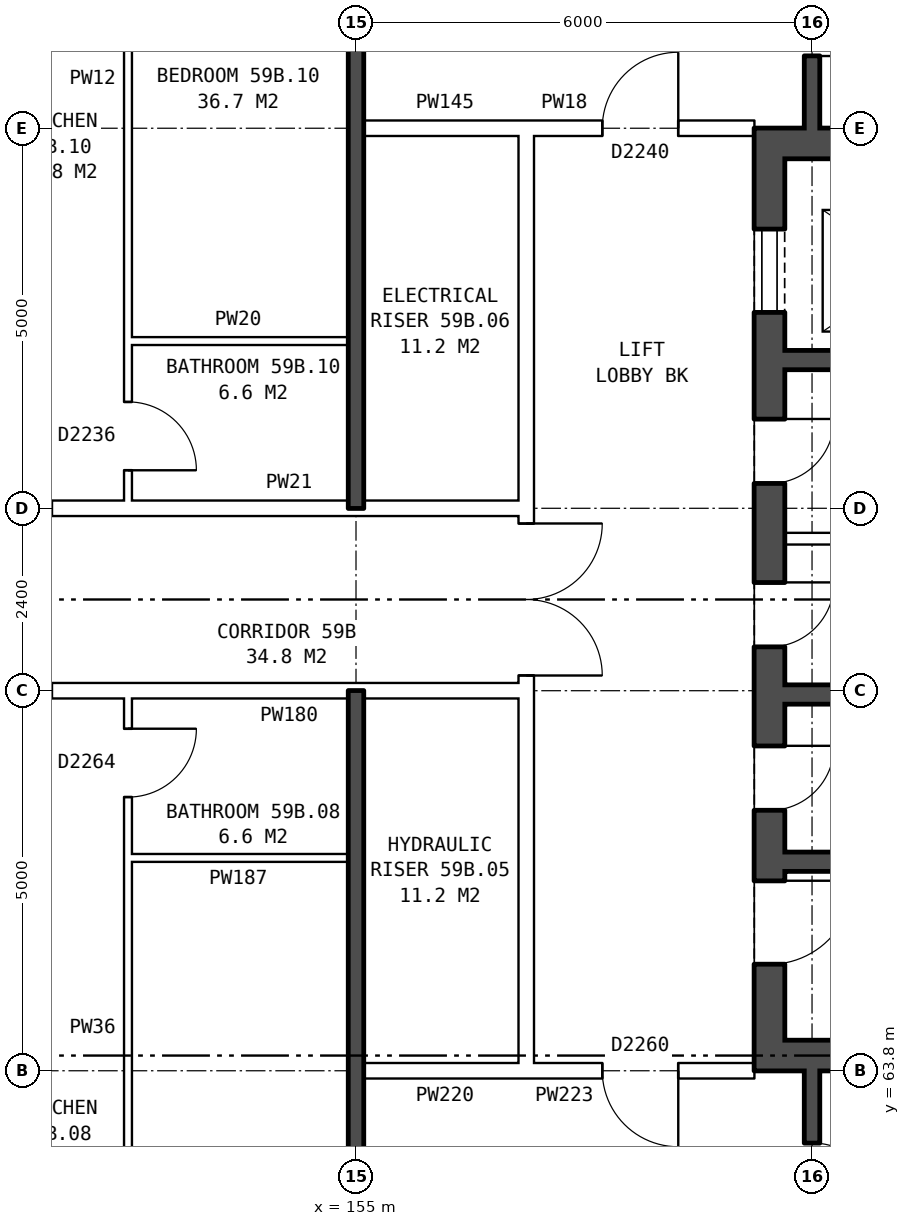
"""IFC4 building model, lengths in metres.
Left out: names, types, materials, properties, quantities, classifications, styles, units other than length and angle.
Written with IfcOpenShell. Run it as: python <this file> out.ifc"""

import sys

from ifc_helpers import new_model, si_unit, direction, frame, frame_2d, origin, place, context, subcontext, project, spatial, rectangle, extrude, element, fill, save


model = new_model("IFC4")
c1 = context("Model", 3, precision=1e-05, world=origin(), true_north=direction((0.0, 1.0)))
c2 = subcontext(c1, "Body", "Model", "MODEL_VIEW")
j1 = project(units=[si_unit("LENGTHUNIT", "METRE"), si_unit("PLANEANGLEUNIT", "RADIAN")], contexts=[c1])
p1 = place(None, origin())
s1 = spatial("IfcSite", under=j1, at=p1, CompositionType="ELEMENT")
p2 = place(p1, origin())
s2 = spatial("IfcBuilding", under=s1, at=p2, CompositionType="ELEMENT")
p3 = place(p2, frame((0.0, 0.0, 209.0)))
s3 = spatial("IfcBuildingStorey", under=s2, at=p3, CompositionType="ELEMENT", Elevation=209.0)
p4 = place(p3, frame((160.44, 76.2, 0.0), z_axis=(0.0, 0.0, 1.0), x_axis=(0.0, -1.0, 0.0)))
e1 = element("IfcWall", 1, at=p4, inside=s3, PredefinedType="SHEAR", context=c2, shape_type="SweptSolid", body=[
    extrude(rectangle(XDim=12.4, YDim=0.4, at=frame_2d((6.2, 0.0))), origin(), (0.0, 0.0, 1.0), 2.85),
])
p5 = place(p4, frame((1.325, 0.0, 0.0)))
e2 = element("IfcOpeningElement", 2, at=p5, cuts=e1, PredefinedType="OPENING", context=c2, shape_type="SweptSolid", body=[
    extrude(rectangle(XDim=1.1, YDim=2.1, at=frame_2d((0.55, 1.05))), frame((0.0, 0.21, 0.0), z_axis=(0.0, -1.0, 0.0), x_axis=(1.0, 0.0, 0.0)), (0.0, 0.0, 1.0), 0.42),
])
p6 = place(p4, frame((3.825, 0.0, 0.0)))
e3 = element("IfcOpeningElement", 3, at=p6, cuts=e1, PredefinedType="OPENING", context=c2, shape_type="SweptSolid", body=[
    extrude(rectangle(XDim=0.85, YDim=2.1, at=frame_2d((0.425, 1.05))), frame((0.0, 0.21, 0.0), z_axis=(0.0, -1.0, 0.0), x_axis=(1.0, 0.0, 0.0)), (0.0, 0.0, 1.0), 0.42),
])
p7 = place(p4, frame((5.975, 0.0, 0.0)))
e4 = element("IfcOpeningElement", 4, at=p7, cuts=e1, PredefinedType="OPENING", context=c2, shape_type="SweptSolid", body=[
    extrude(rectangle(XDim=0.85, YDim=2.1, at=frame_2d((0.425, 1.05))), frame((0.0, 0.21, 0.0), z_axis=(0.0, -1.0, 0.0), x_axis=(1.0, 0.0, 0.0)), (0.0, 0.0, 1.0), 0.42),
])
p8 = place(p4, frame((9.9, 0.0, 0.0)))
e5 = element("IfcOpeningElement", 5, at=p8, cuts=e1, PredefinedType="OPENING", context=c2, shape_type="SweptSolid", body=[
    extrude(rectangle(XDim=1.1, YDim=2.1, at=frame_2d((0.55, 1.05))), frame((0.0, 0.21, 0.0), z_axis=(0.0, -1.0, 0.0), x_axis=(1.0, 0.0, 0.0)), (0.0, 0.0, 1.0), 0.42),
])
p9 = place(p4, frame((8.125, 0.0, 0.0)))
e6 = element("IfcOpeningElement", 6, at=p9, cuts=e1, PredefinedType="OPENING", context=c2, shape_type="SweptSolid", body=[
    extrude(rectangle(XDim=0.85, YDim=2.1, at=frame_2d((0.425, 1.05))), frame((0.0, 0.21, 0.0), z_axis=(0.0, -1.0, 0.0), x_axis=(1.0, 0.0, 0.0)), (0.0, 0.0, 1.0), 0.42),
])
for number, where, z_axis, x_axis in (
    (7, (160.64, 76.0, 0.0), (0.0, 0.0, 1.0), (1.0, 0.0, 0.0)),
    (8, (160.64, 64.0, 0.0), (0.0, 0.0, 1.0), (1.0, 0.0, 0.0)),
):
    element("IfcWall", number, at=place(p3, frame(where, z_axis=z_axis, x_axis=x_axis)), inside=s3, PredefinedType="SHEAR", context=c2, shape_type="SweptSolid", body=[
        extrude(rectangle(XDim=7.6, YDim=0.4, at=frame_2d((3.8, 0.0))), origin(), (0.0, 0.0, 1.0), 2.85),
    ])
p10 = place(p3, frame((160.64, 73.15, 0.0), z_axis=(0.0, 0.0, 1.0), x_axis=(1.0, 0.0, 0.0)))
e9 = element("IfcWall", 9, at=p10, inside=s3, PredefinedType="SHEAR", context=c2, shape_type="SweptSolid", body=[
    extrude(rectangle(XDim=4.775, YDim=0.25, at=frame_2d((2.388, 0.0))), origin(), (0.0, 0.0, 1.0), 2.85),
])
p11 = place(p3, frame((160.64, 70.8, 0.0), z_axis=(0.0, 0.0, 1.0), x_axis=(1.0, 0.0, 0.0)))
e10 = element("IfcWall", 10, at=p11, inside=s3, PredefinedType="PARTITIONING", context=c2, shape_type="SweptSolid", body=[
    extrude(rectangle(XDim=2.525, YDim=0.15, at=frame_2d((1.263, 0.0))), origin(), (0.0, 0.0, 1.0), 2.85),
])
p12 = place(p3, frame((160.64, 68.75, 0.0), z_axis=(0.0, 0.0, 1.0), x_axis=(1.0, 0.0, 0.0)))
e11 = element("IfcWall", 11, at=p12, inside=s3, PredefinedType="SHEAR", context=c2, shape_type="SweptSolid", body=[
    extrude(rectangle(XDim=7.6, YDim=0.25, at=frame_2d((3.8, 0.0))), origin(), (0.0, 0.0, 1.0), 2.85),
])
p13 = place(p12, frame((5.175, 0.0, 0.0)))
e12 = element("IfcOpeningElement", 12, at=p13, cuts=e11, PredefinedType="OPENING", context=c2, shape_type="SweptSolid", body=[
    extrude(rectangle(XDim=1.1, YDim=2.1, at=frame_2d((0.55, 1.05))), frame((0.0, 0.135, 0.0), z_axis=(0.0, -1.0, 0.0), x_axis=(1.0, 0.0, 0.0)), (0.0, 0.0, 1.0), 0.27),
])
p14 = place(p12, frame((2.975, 0.0, 0.0)))
e13 = element("IfcOpeningElement", 13, at=p14, cuts=e11, PredefinedType="OPENING", context=c2, shape_type="SweptSolid", body=[
    extrude(rectangle(XDim=0.85, YDim=2.1, at=frame_2d((0.425, 1.05))), frame((0.0, 0.135, 0.0), z_axis=(0.0, -1.0, 0.0), x_axis=(1.0, 0.0, 0.0)), (0.0, 0.0, 1.0), 0.27),
])
p15 = place(p3, frame((160.64, 66.55, 0.0), z_axis=(0.0, 0.0, 1.0), x_axis=(1.0, 0.0, 0.0)))
e14 = element("IfcWall", 14, at=p15, inside=s3, PredefinedType="SHEAR", context=c2, shape_type="SweptSolid", body=[
    extrude(rectangle(XDim=2.525, YDim=0.25, at=frame_2d((1.263, 0.0))), origin(), (0.0, 0.0, 1.0), 2.85),
])
p16 = place(p3, frame((157.24, 63.9, 0.0), z_axis=(0.0, 0.0, 1.0), x_axis=(0.0, 1.0, 0.0)))
e15 = element("IfcWall", 15, at=p16, inside=s3, PredefinedType="PARTITIONING", context=c2, shape_type="SweptSolid", body=[
    extrude(rectangle(XDim=12.2, YDim=0.2, at=frame_2d((6.1, 0.0))), origin(), (0.0, 0.0, 1.0), 2.85),
])
p17 = place(p16, frame((5.1, 0.0, 0.0)))
e16 = element("IfcOpeningElement", 16, at=p17, cuts=e15, PredefinedType="OPENING", context=c2, shape_type="SweptSolid", body=[
    extrude(rectangle(XDim=2.0, YDim=2.1, at=frame_2d((1.0, 1.05))), frame((0.0, 0.11, 0.0), z_axis=(0.0, -1.0, 0.0), x_axis=(1.0, 0.0, 0.0)), (0.0, 0.0, 1.0), 0.22),
])
p18 = place(p3, frame((155.1, 63.8, 0.0), z_axis=(0.0, 0.0, 1.0), x_axis=(1.0, 0.0, 0.0)))
e17 = element("IfcWall", 17, at=p18, inside=s3, PredefinedType="PARTITIONING", context=c2, shape_type="SweptSolid", body=[
    extrude(rectangle(XDim=2.14, YDim=0.2, at=frame_2d((1.07, 0.0))), origin(), (0.0, 0.0, 1.0), 2.85),
])
p19 = place(p3, frame((157.24, 63.8, 0.0), z_axis=(0.0, 0.0, 1.0), x_axis=(1.0, 0.0, 0.0)))
e18 = element("IfcWall", 18, at=p19, inside=s3, PredefinedType="PARTITIONING", context=c2, shape_type="SweptSolid", body=[
    extrude(rectangle(XDim=3.0, YDim=0.2, at=frame_2d((1.5, 0.0))), origin(), (0.0, 0.0, 1.0), 2.85),
])
p20 = place(p19, frame((1.0, 0.0, 0.0)))
e19 = element("IfcOpeningElement", 19, at=p20, cuts=e18, PredefinedType="OPENING", context=c2, shape_type="SweptSolid", body=[
    extrude(rectangle(XDim=1.0, YDim=2.1, at=frame_2d((0.5, 1.05))), frame((0.0, 0.11, 0.0), z_axis=(0.0, -1.0, 0.0), x_axis=(1.0, 0.0, 0.0)), (0.0, 0.0, 1.0), 0.22),
])
p21 = place(p3, frame((152.0, 66.6, 0.0), z_axis=(0.0, 0.0, 1.0), x_axis=(1.0, 0.0, 0.0)))
e20 = element("IfcWall", 20, at=p21, inside=s3, PredefinedType="PARTITIONING", context=c2, shape_type="SweptSolid", body=[
    extrude(rectangle(XDim=2.9, YDim=0.1, at=frame_2d((1.45, 0.0))), origin(), (0.0, 0.0, 1.0), 2.85),
])
p22 = place(p3, frame((142.76, 68.8, 0.0), z_axis=(0.0, 0.0, 1.0), x_axis=(1.0, 0.0, 0.0)))
e21 = element("IfcWall", 21, at=p22, inside=s3, PredefinedType="PARTITIONING", context=c2, shape_type="SweptSolid", body=[
    extrude(rectangle(XDim=14.48, YDim=0.2, at=frame_2d((7.24, 0.0))), origin(), (0.0, 0.0, 1.0), 2.85),
])
p23 = place(p22, frame((4.24, 0.0, 0.0)))
e22 = element("IfcOpeningElement", 22, at=p23, cuts=e21, PredefinedType="OPENING", context=c2, shape_type="SweptSolid", body=[
    extrude(rectangle(XDim=1.0, YDim=2.1, at=frame_2d((0.5, 1.05))), frame((0.0, 0.11, 0.0), z_axis=(0.0, -1.0, 0.0), x_axis=(1.0, 0.0, 0.0)), (0.0, 0.0, 1.0), 0.22),
])
p24 = place(p22, frame((7.24, 0.0, 0.0)))
e23 = element("IfcOpeningElement", 23, at=p24, cuts=e21, PredefinedType="OPENING", context=c2, shape_type="SweptSolid", body=[
    extrude(rectangle(XDim=1.0, YDim=2.1, at=frame_2d((0.5, 1.05))), frame((0.0, 0.11, 0.0), z_axis=(0.0, -1.0, 0.0), x_axis=(1.0, 0.0, 0.0)), (0.0, 0.0, 1.0), 0.22),
])
p25 = place(p3, frame((142.76, 71.2, 0.0), z_axis=(0.0, 0.0, 1.0), x_axis=(1.0, 0.0, 0.0)))
e24 = element("IfcWall", 24, at=p25, inside=s3, PredefinedType="PARTITIONING", context=c2, shape_type="SweptSolid", body=[
    extrude(rectangle(XDim=14.48, YDim=0.2, at=frame_2d((7.24, 0.0))), origin(), (0.0, 0.0, 1.0), 2.85),
])
p26 = place(p25, frame((4.24, 0.0, 0.0)))
e25 = element("IfcOpeningElement", 25, at=p26, cuts=e24, PredefinedType="OPENING", context=c2, shape_type="SweptSolid", body=[
    extrude(rectangle(XDim=1.0, YDim=2.1, at=frame_2d((0.5, 1.05))), frame((0.0, 0.11, 0.0), z_axis=(0.0, -1.0, 0.0), x_axis=(1.0, 0.0, 0.0)), (0.0, 0.0, 1.0), 0.22),
])
p27 = place(p25, frame((7.24, 0.0, 0.0)))
e26 = element("IfcOpeningElement", 26, at=p27, cuts=e24, PredefinedType="OPENING", context=c2, shape_type="SweptSolid", body=[
    extrude(rectangle(XDim=1.0, YDim=2.1, at=frame_2d((0.5, 1.05))), frame((0.0, 0.11, 0.0), z_axis=(0.0, -1.0, 0.0), x_axis=(1.0, 0.0, 0.0)), (0.0, 0.0, 1.0), 0.22),
])
p28 = place(p3, frame((152.0, 73.4, 0.0), z_axis=(0.0, 0.0, 1.0), x_axis=(1.0, 0.0, 0.0)))
e27 = element("IfcWall", 27, at=p28, inside=s3, PredefinedType="PARTITIONING", context=c2, shape_type="SweptSolid", body=[
    extrude(rectangle(XDim=2.9, YDim=0.1, at=frame_2d((1.45, 0.0))), origin(), (0.0, 0.0, 1.0), 2.85),
])
p29 = place(p3, frame((155.1, 76.2, 0.0), z_axis=(0.0, 0.0, 1.0), x_axis=(1.0, 0.0, 0.0)))
e28 = element("IfcWall", 28, at=p29, inside=s3, PredefinedType="PARTITIONING", context=c2, shape_type="SweptSolid", body=[
    extrude(rectangle(XDim=2.14, YDim=0.2, at=frame_2d((1.07, 0.0))), origin(), (0.0, 0.0, 1.0), 2.85),
])
p30 = place(p3, frame((157.24, 76.2, 0.0), z_axis=(0.0, 0.0, 1.0), x_axis=(1.0, 0.0, 0.0)))
e29 = element("IfcWall", 29, at=p30, inside=s3, PredefinedType="PARTITIONING", context=c2, shape_type="SweptSolid", body=[
    extrude(rectangle(XDim=3.0, YDim=0.2, at=frame_2d((1.5, 0.0))), origin(), (0.0, 0.0, 1.0), 2.85),
])
p31 = place(p30, frame((1.0, 0.0, 0.0)))
e30 = element("IfcOpeningElement", 30, at=p31, cuts=e29, PredefinedType="OPENING", context=c2, shape_type="SweptSolid", body=[
    extrude(rectangle(XDim=1.0, YDim=2.1, at=frame_2d((0.5, 1.05))), frame((0.0, 0.11, 0.0), z_axis=(0.0, -1.0, 0.0), x_axis=(1.0, 0.0, 0.0)), (0.0, 0.0, 1.0), 0.22),
])
p32 = place(p3, frame((152.0, 54.36, 0.0), z_axis=(0.0, 0.0, 1.0), x_axis=(0.0, 1.0, 0.0)))
e31 = element("IfcWall", 31, at=p32, inside=s3, PredefinedType="PARTITIONING", context=c2, shape_type="SweptSolid", body=[
    extrude(rectangle(XDim=14.34, YDim=0.1, at=frame_2d((7.17, 0.0))), origin(), (0.0, 0.0, 1.0), 2.85),
])
p33 = place(p32, frame((5.5, 0.0, 0.0)))
e32 = element("IfcOpeningElement", 32, at=p33, cuts=e31, PredefinedType="OPENING", context=c2, shape_type="SweptSolid", body=[
    extrude(rectangle(XDim=0.9, YDim=2.1, at=frame_2d((0.45, 1.05))), frame((0.0, 0.06, 0.0), z_axis=(0.0, -1.0, 0.0), x_axis=(1.0, 0.0, 0.0)), (0.0, 0.0, 1.0), 0.12),
])
p34 = place(p32, frame((13.04, 0.0, 0.0)))
e33 = element("IfcOpeningElement", 33, at=p34, cuts=e31, PredefinedType="OPENING", context=c2, shape_type="SweptSolid", body=[
    extrude(rectangle(XDim=0.9, YDim=2.1, at=frame_2d((0.45, 1.05))), frame((0.0, 0.06, 0.0), z_axis=(0.0, -1.0, 0.0), x_axis=(1.0, 0.0, 0.0)), (0.0, 0.0, 1.0), 0.12),
])
p35 = place(p3, frame((152.0, 71.3, 0.0), z_axis=(0.0, 0.0, 1.0), x_axis=(0.0, 1.0, 0.0)))
e34 = element("IfcWall", 34, at=p35, inside=s3, PredefinedType="PARTITIONING", context=c2, shape_type="SweptSolid", body=[
    extrude(rectangle(XDim=14.34, YDim=0.1, at=frame_2d((7.17, 0.0))), origin(), (0.0, 0.0, 1.0), 2.85),
])
p36 = place(p35, frame((9.24, 0.0, 0.0)))
e35 = element("IfcOpeningElement", 35, at=p36, cuts=e34, PredefinedType="OPENING", context=c2, shape_type="SweptSolid", body=[
    extrude(rectangle(XDim=0.9, YDim=2.1, at=frame_2d((0.45, 1.05))), frame((0.0, 0.06, 0.0), z_axis=(0.0, -1.0, 0.0), x_axis=(1.0, 0.0, 0.0)), (0.0, 0.0, 1.0), 0.12),
])
p37 = place(p35, frame((0.4, 0.0, 0.0)))
e36 = element("IfcOpeningElement", 36, at=p37, cuts=e34, PredefinedType="OPENING", context=c2, shape_type="SweptSolid", body=[
    extrude(rectangle(XDim=0.9, YDim=2.1, at=frame_2d((0.45, 1.05))), frame((0.0, 0.06, 0.0), z_axis=(0.0, -1.0, 0.0), x_axis=(1.0, 0.0, 0.0)), (0.0, 0.0, 1.0), 0.12),
])
for number, where, z_axis, x_axis in (
    (37, (155.0, 54.36, 0.0), (0.0, 0.0, 1.0), (0.0, 1.0, 0.0)),
    (38, (155.0, 71.2, 0.0), (0.0, 0.0, 1.0), (0.0, 1.0, 0.0)),
):
    element("IfcWall", number, at=place(p3, frame(where, z_axis=z_axis, x_axis=x_axis)), inside=s3, PredefinedType="SOLIDWALL", context=c2, shape_type="SweptSolid", body=[
        extrude(rectangle(XDim=14.44, YDim=0.2, at=frame_2d((7.22, 0.0))), origin(), (0.0, 0.0, 1.0), 2.85),
    ])
p38 = place(p3, frame((161.0, 54.36, 0.0), z_axis=(0.0, 0.0, 1.0), x_axis=(0.0, 1.0, 0.0)))
e39 = element("IfcWall", 39, at=p38, inside=s3, PredefinedType="SOLIDWALL", context=c2, shape_type="SweptSolid", body=[
    extrude(rectangle(XDim=9.44, YDim=0.2, at=frame_2d((4.72, 0.0))), origin(), (0.0, 0.0, 1.0), 2.85),
])
p39 = place(p38, frame((1.37, 0.0, 0.0)))
e40 = element("IfcOpeningElement", 40, at=p39, cuts=e39, PredefinedType="OPENING", context=c2, shape_type="SweptSolid", body=[
    extrude(rectangle(XDim=0.9, YDim=2.1, at=frame_2d((0.45, 1.05))), frame((0.0, 0.11, 0.0), z_axis=(0.0, -1.0, 0.0), x_axis=(1.0, 0.0, 0.0)), (0.0, 0.0, 1.0), 0.22),
])
p40 = place(p38, frame((4.29, 0.0, 0.0)))
e41 = element("IfcOpeningElement", 41, at=p40, cuts=e39, PredefinedType="OPENING", context=c2, shape_type="SweptSolid", body=[
    extrude(rectangle(XDim=0.9, YDim=2.1, at=frame_2d((0.45, 1.05))), frame((0.0, 0.11, 0.0), z_axis=(0.0, -1.0, 0.0), x_axis=(1.0, 0.0, 0.0)), (0.0, 0.0, 1.0), 0.22),
])
p41 = place(p38, frame((7.59, 0.0, 0.0)))
e42 = element("IfcOpeningElement", 42, at=p41, cuts=e39, PredefinedType="OPENING", context=c2, shape_type="SweptSolid", body=[
    extrude(rectangle(XDim=0.9, YDim=2.1, at=frame_2d((0.45, 1.05))), frame((0.0, 0.11, 0.0), z_axis=(0.0, -1.0, 0.0), x_axis=(1.0, 0.0, 0.0)), (0.0, 0.0, 1.0), 0.22),
])
p42 = place(p3, frame((161.0, 76.2, 0.0), z_axis=(0.0, 0.0, 1.0), x_axis=(0.0, 1.0, 0.0)))
e43 = element("IfcWall", 43, at=p42, inside=s3, PredefinedType="SOLIDWALL", context=c2, shape_type="SweptSolid", body=[
    extrude(rectangle(XDim=9.44, YDim=0.2, at=frame_2d((4.72, 0.0))), origin(), (0.0, 0.0, 1.0), 2.85),
])
p43 = place(p42, frame((7.17, 0.0, 0.0)))
e44 = element("IfcOpeningElement", 44, at=p43, cuts=e43, PredefinedType="OPENING", context=c2, shape_type="SweptSolid", body=[
    extrude(rectangle(XDim=0.9, YDim=2.1, at=frame_2d((0.45, 1.05))), frame((0.0, 0.11, 0.0), z_axis=(0.0, -1.0, 0.0), x_axis=(1.0, 0.0, 0.0)), (0.0, 0.0, 1.0), 0.22),
])
p44 = place(p42, frame((4.4, 0.0, 0.0)))
e45 = element("IfcOpeningElement", 45, at=p44, cuts=e43, PredefinedType="OPENING", context=c2, shape_type="SweptSolid", body=[
    extrude(rectangle(XDim=0.9, YDim=2.1, at=frame_2d((0.45, 1.05))), frame((0.0, 0.11, 0.0), z_axis=(0.0, -1.0, 0.0), x_axis=(1.0, 0.0, 0.0)), (0.0, 0.0, 1.0), 0.22),
])
p45 = place(p42, frame((0.95, 0.0, 0.0)))
e46 = element("IfcOpeningElement", 46, at=p45, cuts=e43, PredefinedType="OPENING", context=c2, shape_type="SweptSolid", body=[
    extrude(rectangle(XDim=0.9, YDim=2.1, at=frame_2d((0.45, 1.05))), frame((0.0, 0.11, 0.0), z_axis=(0.0, -1.0, 0.0), x_axis=(1.0, 0.0, 0.0)), (0.0, 0.0, 1.0), 0.22),
])
p46 = place(p5, origin())
e47 = element("IfcDoor", 47, at=p46, inside=s3, OperationType="DOUBLE_DOOR_SLIDING", PredefinedType="DOOR", context=c2, shape_type="SweptSolid", body=[
    extrude(rectangle(XDim=1.1, YDim=2.1, at=frame_2d((0.55, 1.05))), frame((0.0, 0.185, 0.0), z_axis=(0.0, -1.0, 0.0), x_axis=(1.0, 0.0, 0.0)), (0.0, 0.0, 1.0), 0.05),
])
fill(e2, e47)
p47 = place(p6, origin())
e48 = element("IfcDoor", 48, at=p47, inside=s3, OperationType="SINGLE_SWING_LEFT", PredefinedType="DOOR", context=c2, shape_type="SweptSolid", body=[
    extrude(rectangle(XDim=0.85, YDim=2.1, at=frame_2d((0.425, 1.05))), frame((0.0, 0.185, 0.0), z_axis=(0.0, -1.0, 0.0), x_axis=(1.0, 0.0, 0.0)), (0.0, 0.0, 1.0), 0.05),
])
fill(e3, e48)
p48 = place(p7, origin())
e49 = element("IfcDoor", 49, at=p48, inside=s3, OperationType="SINGLE_SWING_LEFT", PredefinedType="DOOR", context=c2, shape_type="SweptSolid", body=[
    extrude(rectangle(XDim=0.85, YDim=2.1, at=frame_2d((0.425, 1.05))), frame((0.0, 0.185, 0.0), z_axis=(0.0, -1.0, 0.0), x_axis=(1.0, 0.0, 0.0)), (0.0, 0.0, 1.0), 0.05),
])
fill(e4, e49)
p49 = place(p8, origin())
e50 = element("IfcDoor", 50, at=p49, inside=s3, OperationType="SINGLE_SWING_LEFT", PredefinedType="DOOR", context=c2, shape_type="SweptSolid", body=[
    extrude(rectangle(XDim=1.1, YDim=2.1, at=frame_2d((0.55, 1.05))), frame((0.0, 0.185, 0.0), z_axis=(0.0, -1.0, 0.0), x_axis=(1.0, 0.0, 0.0)), (0.0, 0.0, 1.0), 0.05),
])
fill(e5, e50)
p50 = place(p9, origin())
e51 = element("IfcDoor", 51, at=p50, inside=s3, OperationType="SINGLE_SWING_LEFT", PredefinedType="DOOR", context=c2, shape_type="SweptSolid", body=[
    extrude(rectangle(XDim=0.85, YDim=2.1, at=frame_2d((0.425, 1.05))), frame((0.0, 0.185, 0.0), z_axis=(0.0, -1.0, 0.0), x_axis=(1.0, 0.0, 0.0)), (0.0, 0.0, 1.0), 0.05),
])
fill(e6, e51)
p51 = place(p17, frame((2.0, 0.0, 0.0), z_axis=(0.0, 0.0, 1.0), x_axis=(-1.0, 0.0, 0.0)))
e52 = element("IfcDoor", 52, at=p51, inside=s3, OperationType="DOUBLE_DOOR_SINGLE_SWING", PredefinedType="DOOR", context=c2, shape_type="SweptSolid", body=[
    extrude(rectangle(XDim=2.0, YDim=2.1, at=frame_2d((1.0, 1.05))), frame((0.0, 0.025, 0.0), z_axis=(0.0, -1.0, 0.0), x_axis=(1.0, 0.0, 0.0)), (0.0, 0.0, 1.0), 0.05),
])
fill(e16, e52)
p52 = place(p41, frame((0.9, 0.0, 0.0), z_axis=(0.0, 0.0, 1.0), x_axis=(-1.0, 0.0, 0.0)))
e53 = element("IfcDoor", 53, at=p52, inside=s3, OperationType="SINGLE_SWING_RIGHT", PredefinedType="DOOR", context=c2, shape_type="SweptSolid", body=[
    extrude(rectangle(XDim=0.9, YDim=2.1, at=frame_2d((0.45, 1.05))), frame((0.0, 0.025, 0.0), z_axis=(0.0, -1.0, 0.0), x_axis=(1.0, 0.0, 0.0)), (0.0, 0.0, 1.0), 0.05),
])
fill(e42, e53)
p53 = place(p20, frame((1.0, 0.0, 0.0), z_axis=(0.0, 0.0, 1.0), x_axis=(-1.0, 0.0, 0.0)))
e54 = element("IfcDoor", 54, at=p53, inside=s3, OperationType="SINGLE_SWING_LEFT", PredefinedType="DOOR", context=c2, shape_type="SweptSolid", body=[
    extrude(rectangle(XDim=1.0, YDim=2.1, at=frame_2d((0.5, 1.05))), frame((0.0, 0.025, 0.0), z_axis=(0.0, -1.0, 0.0), x_axis=(1.0, 0.0, 0.0)), (0.0, 0.0, 1.0), 0.05),
])
fill(e19, e54)
p54 = place(p45, frame((0.9, 0.0, 0.0), z_axis=(0.0, 0.0, 1.0), x_axis=(-1.0, 0.0, 0.0)))
e55 = element("IfcDoor", 55, at=p54, inside=s3, OperationType="SINGLE_SWING_RIGHT", PredefinedType="DOOR", context=c2, shape_type="SweptSolid", body=[
    extrude(rectangle(XDim=0.9, YDim=2.1, at=frame_2d((0.45, 1.05))), frame((0.0, 0.025, 0.0), z_axis=(0.0, -1.0, 0.0), x_axis=(1.0, 0.0, 0.0)), (0.0, 0.0, 1.0), 0.05),
])
fill(e46, e55)
p55 = place(p31, origin())
e56 = element("IfcDoor", 56, at=p55, inside=s3, OperationType="SINGLE_SWING_RIGHT", PredefinedType="DOOR", context=c2, shape_type="SweptSolid", body=[
    extrude(rectangle(XDim=1.0, YDim=2.1, at=frame_2d((0.5, 1.05))), frame((0.0, 0.025, 0.0), z_axis=(0.0, -1.0, 0.0), x_axis=(1.0, 0.0, 0.0)), (0.0, 0.0, 1.0), 0.05),
])
fill(e30, e56)
p56 = place(p34, frame((0.9, 0.0, 0.0), z_axis=(0.0, 0.0, 1.0), x_axis=(-1.0, 0.0, 0.0)))
e57 = element("IfcDoor", 57, at=p56, inside=s3, OperationType="SINGLE_SWING_LEFT", PredefinedType="DOOR", context=c2, shape_type="SweptSolid", body=[
    extrude(rectangle(XDim=0.9, YDim=2.1, at=frame_2d((0.45, 1.05))), frame((0.0, 0.025, 0.0), z_axis=(0.0, -1.0, 0.0), x_axis=(1.0, 0.0, 0.0)), (0.0, 0.0, 1.0), 0.05),
])
fill(e33, e57)
p57 = place(p37, frame((0.9, 0.0, 0.0), z_axis=(0.0, 0.0, 1.0), x_axis=(-1.0, 0.0, 0.0)))
e58 = element("IfcDoor", 58, at=p57, inside=s3, OperationType="SINGLE_SWING_RIGHT", PredefinedType="DOOR", context=c2, shape_type="SweptSolid", body=[
    extrude(rectangle(XDim=0.9, YDim=2.1, at=frame_2d((0.45, 1.05))), frame((0.0, 0.025, 0.0), z_axis=(0.0, -1.0, 0.0), x_axis=(1.0, 0.0, 0.0)), (0.0, 0.0, 1.0), 0.05),
])
fill(e36, e58)
save(model, sys.argv[1])
